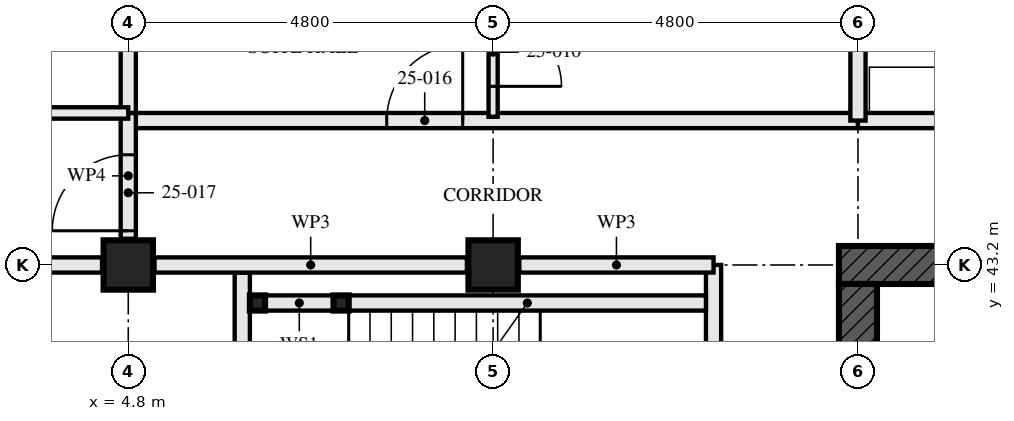
"""IFC4 building model, lengths in metres.
Left out: names, types, materials, properties, quantities, classifications, styles, units other than length and angle.
Written with IfcOpenShell. Run it as: python <this file> out.ifc"""

import sys

from ifc_helpers import new_model, si_unit, direction, frame, frame_2d, origin, origin_2d, place, context, subcontext, project, spatial, rectangle, hollow_rectangle, extrude, element, fill, save


model = new_model("IFC4")
c1 = context("Model", 3, precision=1e-05, world=origin(), true_north=direction((0.0, 1.0)))
c2 = subcontext(c1, "Body", "Model", "MODEL_VIEW")
j1 = project(units=[si_unit("LENGTHUNIT", "METRE"), si_unit("PLANEANGLEUNIT", "RADIAN")], contexts=[c1])
p1 = place(None, origin())
s1 = spatial("IfcSite", under=j1, at=p1, CompositionType="ELEMENT")
p2 = place(p1, origin())
s2 = spatial("IfcBuilding", under=s1, at=p2, CompositionType="ELEMENT")
p3 = place(p2, frame((0.0, 0.0, 94.5)))
s3 = spatial("IfcBuildingStorey", under=s2, at=p3, CompositionType="ELEMENT", Elevation=94.5)
for number, where, z_axis, x_axis in (
    (1, (4.8, 43.2, 0.0), (0.0, 0.0, 1.0), (0.0, 1.0, 0.0)),
    (2, (9.6, 43.2, 0.0), (0.0, 0.0, 1.0), (0.0, 1.0, 0.0)),
):
    element("IfcColumn", number, at=place(p3, frame(where, z_axis=z_axis, x_axis=x_axis)), inside=s3, PredefinedType="COLUMN", context=c2, shape_type="SweptSolid", body=[
        extrude(hollow_rectangle(XDim=0.65, YDim=0.65, WallThickness=0.05, at=origin_2d()), origin(), (0.0, 0.0, 1.0), 3.5),
    ])
p4 = place(p3, frame((29.05, 43.2, -0.17), z_axis=(0.0, 0.0, 1.0), x_axis=(-1.0, 0.0, 0.0)))
e3 = element("IfcWall", 3, at=p4, inside=s3, PredefinedType="SHEAR", context=c2, shape_type="SweptSolid", body=[
    extrude(rectangle(XDim=14.9, YDim=0.5, at=frame_2d((7.45, 0.0))), origin(), (0.0, 0.0, 1.0), 3.5),
])
p5 = place(p4, frame((6.85, 0.0, 0.17)))
e4 = element("IfcOpeningElement", 4, at=p5, cuts=e3, PredefinedType="OPENING", context=c2, shape_type="SweptSolid", body=[
    extrude(rectangle(XDim=1.2, YDim=2.1, at=frame_2d((0.6, 1.05))), frame((0.0, 0.26, 0.0), z_axis=(0.0, -1.0, 0.0), x_axis=(1.0, 0.0, 0.0)), (0.0, 0.0, 1.0), 0.521),
])
p6 = place(p3, frame((14.4, 42.95, -0.17), z_axis=(0.0, 0.0, 1.0), x_axis=(0.0, -1.0, 0.0)))
e5 = element("IfcWall", 5, at=p6, inside=s3, PredefinedType="SHEAR", context=c2, shape_type="SweptSolid", body=[
    extrude(rectangle(XDim=13.9, YDim=0.5, at=frame_2d((6.95, 0.0))), origin(), (0.0, 0.0, 1.0), 3.5),
])
p7 = place(p6, frame((6.35, 0.0, 0.17)))
e6 = element("IfcOpeningElement", 6, at=p7, cuts=e5, PredefinedType="OPENING", context=c2, shape_type="SweptSolid", body=[
    extrude(rectangle(XDim=1.2, YDim=2.1, at=frame_2d((0.6, 1.05))), frame((0.0, 0.26, 0.0), z_axis=(0.0, -1.0, 0.0), x_axis=(1.0, 0.0, 0.0)), (0.0, 0.0, 1.0), 0.521),
])
for number, where, z_axis, x_axis in (
    (7, (6.5, 42.7, 0.0), (0.0, 0.0, 1.0), (1.0, 0.0, 0.0)),
    (8, (7.6, 42.7, 0.0), (0.0, 0.0, 1.0), (1.0, 0.0, 0.0)),
):
    element("IfcColumn", number, at=place(p3, frame(where, z_axis=z_axis, x_axis=x_axis)), inside=s3, PredefinedType="COLUMN", context=c2, shape_type="SweptSolid", body=[
        extrude(hollow_rectangle(XDim=0.2, YDim=0.2, WallThickness=0.008, at=origin_2d()), origin(), (0.0, 0.0, 1.0), 3.33),
    ])
p8 = place(p3, frame((6.6, 42.7, 0.0), z_axis=(0.0, 0.0, 1.0), x_axis=(1.0, 0.0, 0.0)))
e9 = element("IfcWall", 9, at=p8, inside=s3, PredefinedType="SOLIDWALL", context=c2, shape_type="SweptSolid", body=[
    extrude(rectangle(XDim=0.9, YDim=0.2, at=frame_2d((0.45, 0.0))), origin(), (0.0, 0.0, 1.0), 2.99),
])
p9 = place(p3, frame((7.7, 42.7, 0.0), z_axis=(0.0, 0.0, 1.0), x_axis=(1.0, 0.0, 0.0)))
e10 = element("IfcWall", 10, at=p9, inside=s3, PredefinedType="SOLIDWALL", context=c2, shape_type="SweptSolid", body=[
    extrude(rectangle(XDim=4.7, YDim=0.2, at=frame_2d((2.35, 0.0))), origin(), (0.0, 0.0, 1.0), 2.99),
])
p10 = place(p3, frame((6.3, 43.1, 0.0), z_axis=(0.0, 0.0, 1.0), x_axis=(0.0, -1.0, 0.0)))
e11 = element("IfcWall", 11, at=p10, inside=s3, PredefinedType="SOLIDWALL", context=c2, shape_type="SweptSolid", body=[
    extrude(rectangle(XDim=3.3, YDim=0.2, at=frame_2d((1.65, 0.0))), origin(), (0.0, 0.0, 1.0), 3.33),
])
p11 = place(p3, frame((12.5, 43.2, 0.0), z_axis=(0.0, 0.0, 1.0), x_axis=(0.0, -1.0, 0.0)))
e12 = element("IfcWall", 12, at=p11, inside=s3, PredefinedType="PARTITIONING", context=c2, shape_type="SweptSolid", body=[
    extrude(rectangle(XDim=14.84, YDim=0.2, at=frame_2d((7.42, 0.0))), origin(), (0.0, 0.0, 1.0), 2.32),
])
p12 = place(p11, frame((1.4, 0.0, 0.0)))
e13 = element("IfcOpeningElement", 13, at=p12, cuts=e12, PredefinedType="OPENING", context=c2, shape_type="SweptSolid", body=[
    extrude(rectangle(XDim=1.0, YDim=2.1, at=frame_2d((0.5, 1.05))), frame((0.0, 0.111, 0.0), z_axis=(0.0, -1.0, 0.0), x_axis=(1.0, 0.0, 0.0)), (0.0, 0.0, 1.0), 0.221),
])
p13 = place(p11, frame((5.2, 0.0, 0.0)))
e14 = element("IfcOpeningElement", 14, at=p13, cuts=e12, PredefinedType="OPENING", context=c2, shape_type="SweptSolid", body=[
    extrude(rectangle(XDim=1.0, YDim=2.1, at=frame_2d((0.5, 1.05))), frame((0.0, 0.111, 0.0), z_axis=(0.0, -1.0, 0.0), x_axis=(1.0, 0.0, 0.0)), (0.0, 0.0, 1.0), 0.221),
])
p14 = place(p11, frame((13.0, 0.0, 0.0)))
e15 = element("IfcOpeningElement", 15, at=p14, cuts=e12, PredefinedType="OPENING", context=c2, shape_type="SweptSolid", body=[
    extrude(rectangle(XDim=1.0, YDim=2.1, at=frame_2d((0.5, 1.05))), frame((0.0, 0.111, 0.0), z_axis=(0.0, -1.0, 0.0), x_axis=(1.0, 0.0, 0.0)), (0.0, 0.0, 1.0), 0.221),
])
p15 = place(p3, frame((9.6, 49.8, 0.0), z_axis=(0.0, 0.0, 1.0), x_axis=(0.0, -1.0, 0.0)))
e16 = element("IfcWall", 16, at=p15, inside=s3, PredefinedType="PARTITIONING", context=c2, shape_type="SweptSolid", body=[
    extrude(rectangle(XDim=4.65, YDim=0.12, at=frame_2d((2.325, 0.0))), origin(), (0.0, 0.0, 1.0), 2.55),
])
p16 = place(p15, frame((3.35, 0.0, 0.0)))
e17 = element("IfcOpeningElement", 17, at=p16, cuts=e16, PredefinedType="OPENING", context=c2, shape_type="SweptSolid", body=[
    extrude(rectangle(XDim=0.9, YDim=2.1, at=frame_2d((0.45, 1.05))), frame((0.0, 0.071, 0.0), z_axis=(0.0, -1.0, 0.0), x_axis=(1.0, 0.0, 0.0)), (0.0, 0.0, 1.0), 0.141),
])
p17 = place(p3, frame((4.8, 52.48, 0.0), z_axis=(0.0, 0.0, 1.0), x_axis=(0.0, -1.0, 0.0)))
e18 = element("IfcWall", 18, at=p17, inside=s3, PredefinedType="PARTITIONING", context=c2, shape_type="SweptSolid", body=[
    extrude(rectangle(XDim=7.28, YDim=0.2, at=frame_2d((3.64, 0.0))), origin(), (0.0, 0.0, 1.0), 2.55),
])
p18 = place(p3, frame((4.8, 45.2, 0.0), z_axis=(0.0, 0.0, 1.0), x_axis=(-1.0, 0.0, 0.0)))
e19 = element("IfcWall", 19, at=p18, inside=s3, PredefinedType="PARTITIONING", context=c2, shape_type="SweptSolid", body=[
    extrude(rectangle(XDim=2.8, YDim=0.15, at=frame_2d((1.4, 0.0))), origin(), (0.0, 0.0, 1.0), 3.33),
])
p19 = place(p3, frame((14.4, 45.1, 0.0), z_axis=(0.0, 0.0, 1.0), x_axis=(-1.0, 0.0, 0.0)))
e20 = element("IfcWall", 20, at=p19, inside=s3, PredefinedType="PARTITIONING", context=c2, shape_type="SweptSolid", body=[
    extrude(rectangle(XDim=9.6, YDim=0.2, at=frame_2d((4.8, 0.0))), origin(), (0.0, 0.0, 1.0), 3.33),
])
p20 = place(p19, frame((5.2, 0.0, 0.0)))
e21 = element("IfcOpeningElement", 21, at=p20, cuts=e20, PredefinedType="OPENING", context=c2, shape_type="SweptSolid", body=[
    extrude(rectangle(XDim=1.0, YDim=2.1, at=frame_2d((0.5, 1.05))), frame((0.0, 0.111, 0.0), z_axis=(0.0, -1.0, 0.0), x_axis=(1.0, 0.0, 0.0)), (0.0, 0.0, 1.0), 0.221),
])
p21 = place(p3, frame((4.8, 45.2, 0.0), z_axis=(0.0, 0.0, 1.0), x_axis=(0.0, -1.0, 0.0)))
e22 = element("IfcWall", 22, at=p21, inside=s3, PredefinedType="PARTITIONING", context=c2, shape_type="SweptSolid", body=[
    extrude(rectangle(XDim=1.655, YDim=0.2, at=frame_2d((0.828, 0.0))), origin(), (0.0, 0.0, 1.0), 3.33),
])
p22 = place(p21, frame((0.55, 0.0, 0.0)))
e23 = element("IfcOpeningElement", 23, at=p22, cuts=e22, PredefinedType="OPENING", context=c2, shape_type="SweptSolid", body=[
    extrude(rectangle(XDim=1.0, YDim=2.1, at=frame_2d((0.5, 1.05))), frame((0.0, 0.111, 0.0), z_axis=(0.0, -1.0, 0.0), x_axis=(1.0, 0.0, 0.0)), (0.0, 0.0, 1.0), 0.221),
])
p23 = place(p3, frame((29.24, 45.1, 0.0), z_axis=(0.0, 0.0, 1.0), x_axis=(-1.0, 0.0, 0.0)))
e24 = element("IfcWall", 24, at=p23, inside=s3, PredefinedType="PARTITIONING", context=c2, shape_type="SweptSolid", body=[
    extrude(rectangle(XDim=14.84, YDim=0.2, at=frame_2d((7.42, 0.0))), origin(), (0.0, 0.0, 1.0), 2.32),
])
p24 = place(p23, frame((0.84, 0.0, 0.0)))
e25 = element("IfcOpeningElement", 25, at=p24, cuts=e24, PredefinedType="OPENING", context=c2, shape_type="SweptSolid", body=[
    extrude(rectangle(XDim=1.0, YDim=2.1, at=frame_2d((0.5, 1.05))), frame((0.0, 0.111, 0.0), z_axis=(0.0, -1.0, 0.0), x_axis=(1.0, 0.0, 0.0)), (0.0, 0.0, 1.0), 0.221),
])
p25 = place(p23, frame((5.64, 0.0, 0.0)))
e26 = element("IfcOpeningElement", 26, at=p25, cuts=e24, PredefinedType="OPENING", context=c2, shape_type="SweptSolid", body=[
    extrude(rectangle(XDim=1.0, YDim=2.1, at=frame_2d((0.5, 1.05))), frame((0.0, 0.111, 0.0), z_axis=(0.0, -1.0, 0.0), x_axis=(1.0, 0.0, 0.0)), (0.0, 0.0, 1.0), 0.221),
])
p26 = place(p23, frame((10.44, 0.0, 0.0)))
e27 = element("IfcOpeningElement", 27, at=p26, cuts=e24, PredefinedType="OPENING", context=c2, shape_type="SweptSolid", body=[
    extrude(rectangle(XDim=1.0, YDim=2.1, at=frame_2d((0.5, 1.05))), frame((0.0, 0.111, 0.0), z_axis=(0.0, -1.0, 0.0), x_axis=(1.0, 0.0, 0.0)), (0.0, 0.0, 1.0), 0.221),
])
p27 = place(p3, frame((12.5, 43.2, 0.0), z_axis=(0.0, 0.0, 1.0), x_axis=(-1.0, 0.0, 0.0)))
e28 = element("IfcWall", 28, at=p27, inside=s3, PredefinedType="PARTITIONING", context=c2, shape_type="SweptSolid", body=[
    extrude(rectangle(XDim=2.555, YDim=0.2, at=frame_2d((1.277, 0.0))), origin(), (0.0, 0.0, 1.0), 2.32),
])
p28 = place(p3, frame((9.255, 43.2, 0.0), z_axis=(0.0, 0.0, 1.0), x_axis=(-1.0, 0.0, 0.0)))
e29 = element("IfcWall", 29, at=p28, inside=s3, PredefinedType="PARTITIONING", context=c2, shape_type="SweptSolid", body=[
    extrude(rectangle(XDim=4.11, YDim=0.2, at=frame_2d((2.055, 0.0))), origin(), (0.0, 0.0, 1.0), 2.32),
])
p29 = place(p3, frame((4.455, 43.2, 0.0), z_axis=(0.0, 0.0, 1.0), x_axis=(-1.0, 0.0, 0.0)))
e30 = element("IfcWall", 30, at=p29, inside=s3, PredefinedType="PARTITIONING", context=c2, shape_type="SweptSolid", body=[
    extrude(rectangle(XDim=4.151, YDim=0.2, at=frame_2d((2.075, 0.0))), origin(), (0.0, 0.0, 1.0), 2.32),
])
p30 = place(p3, frame((14.4, 45.1, 0.0), z_axis=(0.0, 0.0, 1.0), x_axis=(0.0, 1.0, 0.0)))
e31 = element("IfcWall", 31, at=p30, inside=s3, PredefinedType="PARTITIONING", context=c2, shape_type="SweptSolid", body=[
    extrude(rectangle(XDim=2.605, YDim=0.2, at=frame_2d((1.302, 0.0))), origin(), (0.0, 0.0, 1.0), 2.32),
])
p31 = place(p16, origin())
e32 = element("IfcDoor", 32, at=p31, inside=s3, OperationType="SINGLE_SWING_LEFT", PredefinedType="DOOR", context=c2, shape_type="SweptSolid", body=[
    extrude(rectangle(XDim=0.9, YDim=2.1, at=frame_2d((0.45, 1.05))), frame((0.0, 0.022, 0.0), z_axis=(0.0, -1.0, 0.0), x_axis=(1.0, 0.0, 0.0)), (0.0, 0.0, 1.0), 0.044),
])
fill(e17, e32)
p32 = place(p20, frame((1.0, 0.0, 0.0), z_axis=(0.0, 0.0, 1.0), x_axis=(-1.0, 0.0, 0.0)))
e33 = element("IfcDoor", 33, at=p32, inside=s3, OperationType="SINGLE_SWING_LEFT", PredefinedType="DOOR", context=c2, shape_type="SweptSolid", body=[
    extrude(rectangle(XDim=1.0, YDim=2.1, at=frame_2d((0.5, 1.05))), frame((0.0, 0.027, 0.0), z_axis=(0.0, -1.0, 0.0), x_axis=(1.0, 0.0, 0.0)), (0.0, 0.0, 1.0), 0.054),
])
fill(e21, e33)
p33 = place(p22, frame((1.0, 0.0, 0.0), z_axis=(0.0, 0.0, 1.0), x_axis=(-1.0, 0.0, 0.0)))
e34 = element("IfcDoor", 34, at=p33, inside=s3, OperationType="SINGLE_SWING_RIGHT", PredefinedType="DOOR", context=c2, shape_type="SweptSolid", body=[
    extrude(rectangle(XDim=1.0, YDim=2.1, at=frame_2d((0.5, 1.05))), frame((0.0, 0.027, 0.0), z_axis=(0.0, -1.0, 0.0), x_axis=(1.0, 0.0, 0.0)), (0.0, 0.0, 1.0), 0.054),
])
fill(e23, e34)
save(model, sys.argv[1])
